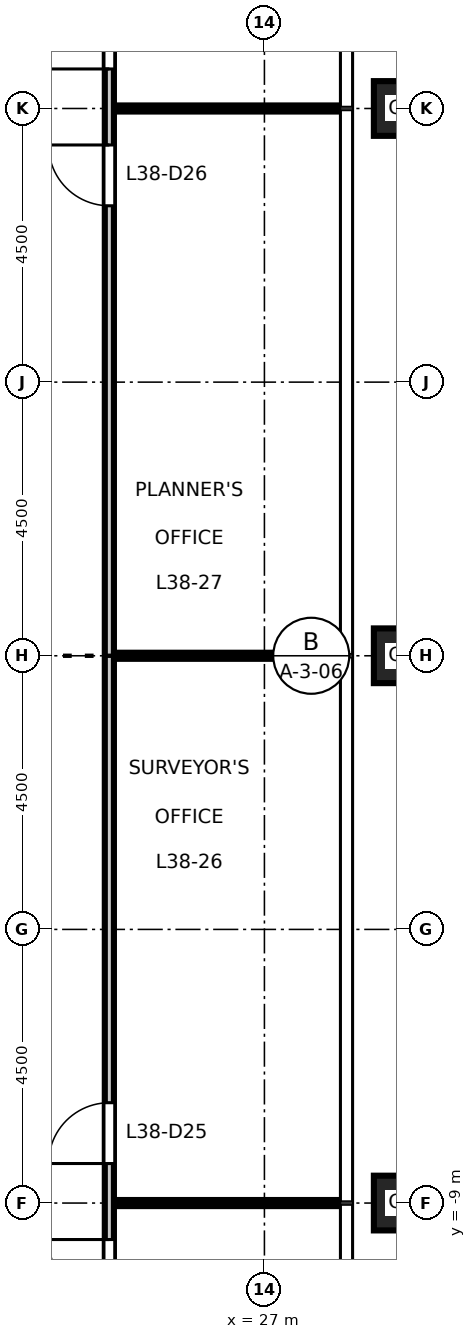
"""IFC4 building model, lengths in metres.
Left out: names, types, materials, properties, quantities, classifications, styles, units other than length and angle.
Written with IfcOpenShell. Run it as: python <this file> out.ifc"""

import sys

from ifc_helpers import new_model, si_unit, direction, frame, frame_2d, origin, origin_2d, place, context, subcontext, project, spatial, rectangle, hollow_rectangle, extrude, element, fill, save


model = new_model("IFC4")
c1 = context("Model", 3, precision=1e-05, world=origin(), true_north=direction((0.0, 1.0)))
c2 = subcontext(c1, "Body", "Model", "MODEL_VIEW")
j1 = project(units=[si_unit("LENGTHUNIT", "METRE"), si_unit("PLANEANGLEUNIT", "RADIAN")], contexts=[c1])
p1 = place(None, origin())
s1 = spatial("IfcSite", under=j1, at=p1, CompositionType="ELEMENT")
p2 = place(p1, origin())
s2 = spatial("IfcBuilding", under=s1, at=p2, CompositionType="ELEMENT")
p3 = place(p2, frame((0.0, 0.0, 176.7)))
s3 = spatial("IfcBuildingStorey", under=s2, at=p3, CompositionType="ELEMENT", Elevation=176.7)
for number, where, z_axis, x_axis in (
    (1, (29.25, -9.0, 0.0), (0.0, 0.0, 1.0), (1.0, 0.0, 0.0)),
    (2, (29.25, 0.0, 0.0), (0.0, 0.0, 1.0), (1.0, 0.0, 0.0)),
    (3, (29.25, 9.0, 0.0), (0.0, 0.0, 1.0), (1.0, 0.0, 0.0)),
):
    element("IfcColumn", number, at=place(p3, frame(where, z_axis=z_axis, x_axis=x_axis)), inside=s3, PredefinedType="COLUMN", context=c2, shape_type="SweptSolid", body=[
        extrude(hollow_rectangle(XDim=0.9, YDim=0.9, WallThickness=0.05, at=origin_2d()), origin(), (0.0, 0.0, 1.0), 4.5),
    ])
for number, where, z_axis, x_axis in (
    (4, (24.525, -9.0, 0.0), (0.0, 0.0, 1.0), (1.0, 0.0, 0.0)),
    (5, (24.525, 0.0, 0.0), (0.0, 0.0, 1.0), (1.0, 0.0, 0.0)),
    (6, (24.525, 9.0, 0.0), (0.0, 0.0, 1.0), (1.0, 0.0, 0.0)),
):
    element("IfcWall", number, at=place(p3, frame(where, z_axis=z_axis, x_axis=x_axis)), inside=s3, PredefinedType="PARTITIONING", context=c2, shape_type="SweptSolid", body=[
        extrude(rectangle(XDim=3.735, YDim=0.1, at=frame_2d((1.868, 0.0))), origin(), (0.0, 0.0, 1.0), 4.3),
    ])
p4 = place(p3, frame((24.45, -18.925, 0.0), z_axis=(0.0, 0.0, 1.0), x_axis=(0.0, 1.0, 0.0)))
e7 = element("IfcWall", 7, at=p4, inside=s3, PredefinedType="PARTITIONING", context=c2, shape_type="SweptSolid", body=[
    extrude(rectangle(XDim=37.85, YDim=0.15, at=frame_2d((18.925, 0.0))), origin(), (0.0, 0.0, 1.0), 4.3),
])
p5 = place(p4, frame((8.325, 0.0, 0.0)))
e8 = element("IfcOpeningElement", 8, at=p5, cuts=e7, PredefinedType="OPENING", context=c2, shape_type="SweptSolid", body=[
    extrude(rectangle(XDim=1.0, YDim=2.1, at=frame_2d((0.5, 1.05))), frame((0.0, 0.085, 0.0), z_axis=(0.0, -1.0, 0.0), x_axis=(1.0, 0.0, 0.0)), (0.0, 0.0, 1.0), 0.17),
])
p6 = place(p4, frame((10.575, 0.0, 0.0)))
e9 = element("IfcOpeningElement", 9, at=p6, cuts=e7, PredefinedType="OPENING", context=c2, shape_type="SweptSolid", body=[
    extrude(rectangle(XDim=1.0, YDim=2.1, at=frame_2d((0.5, 1.05))), frame((0.0, 0.085, 0.0), z_axis=(0.0, -1.0, 0.0), x_axis=(1.0, 0.0, 0.0)), (0.0, 0.0, 1.0), 0.17),
])
p7 = place(p4, frame((26.325, 0.0, 0.0)))
e10 = element("IfcOpeningElement", 10, at=p7, cuts=e7, PredefinedType="OPENING", context=c2, shape_type="SweptSolid", body=[
    extrude(rectangle(XDim=1.0, YDim=2.1, at=frame_2d((0.5, 1.05))), frame((0.0, 0.085, 0.0), z_axis=(0.0, -1.0, 0.0), x_axis=(1.0, 0.0, 0.0)), (0.0, 0.0, 1.0), 0.17),
])
p8 = place(p4, frame((28.575, 0.0, 0.0)))
e11 = element("IfcOpeningElement", 11, at=p8, cuts=e7, PredefinedType="OPENING", context=c2, shape_type="SweptSolid", body=[
    extrude(rectangle(XDim=1.0, YDim=2.1, at=frame_2d((0.5, 1.05))), frame((0.0, 0.085, 0.0), z_axis=(0.0, -1.0, 0.0), x_axis=(1.0, 0.0, 0.0)), (0.0, 0.0, 1.0), 0.17),
])
p9 = place(p5, origin())
e12 = element("IfcDoor", 12, at=p9, inside=s3, OperationType="SINGLE_SWING_RIGHT", PredefinedType="DOOR", context=c2, shape_type="SweptSolid", body=[
    extrude(rectangle(XDim=1.0, YDim=2.1, at=frame_2d((0.5, 1.05))), frame((0.0, 0.025, 0.0), z_axis=(0.0, -1.0, 0.0), x_axis=(1.0, 0.0, 0.0)), (0.0, 0.0, 1.0), 0.05),
])
fill(e8, e12)
p10 = place(p6, origin())
e13 = element("IfcDoor", 13, at=p10, inside=s3, OperationType="SINGLE_SWING_LEFT", PredefinedType="DOOR", context=c2, shape_type="SweptSolid", body=[
    extrude(rectangle(XDim=1.0, YDim=2.1, at=frame_2d((0.5, 1.05))), frame((0.0, 0.025, 0.0), z_axis=(0.0, -1.0, 0.0), x_axis=(1.0, 0.0, 0.0)), (0.0, 0.0, 1.0), 0.05),
])
fill(e9, e13)
p11 = place(p7, origin())
e14 = element("IfcDoor", 14, at=p11, inside=s3, OperationType="SINGLE_SWING_RIGHT", PredefinedType="DOOR", context=c2, shape_type="SweptSolid", body=[
    extrude(rectangle(XDim=1.0, YDim=2.1, at=frame_2d((0.5, 1.05))), frame((0.0, 0.025, 0.0), z_axis=(0.0, -1.0, 0.0), x_axis=(1.0, 0.0, 0.0)), (0.0, 0.0, 1.0), 0.05),
])
fill(e10, e14)
p12 = place(p8, origin())
e15 = element("IfcDoor", 15, at=p12, inside=s3, OperationType="SINGLE_SWING_LEFT", PredefinedType="DOOR", context=c2, shape_type="SweptSolid", body=[
    extrude(rectangle(XDim=1.0, YDim=2.1, at=frame_2d((0.5, 1.05))), frame((0.0, 0.025, 0.0), z_axis=(0.0, -1.0, 0.0), x_axis=(1.0, 0.0, 0.0)), (0.0, 0.0, 1.0), 0.05),
])
fill(e11, e15)
save(model, sys.argv[1])
